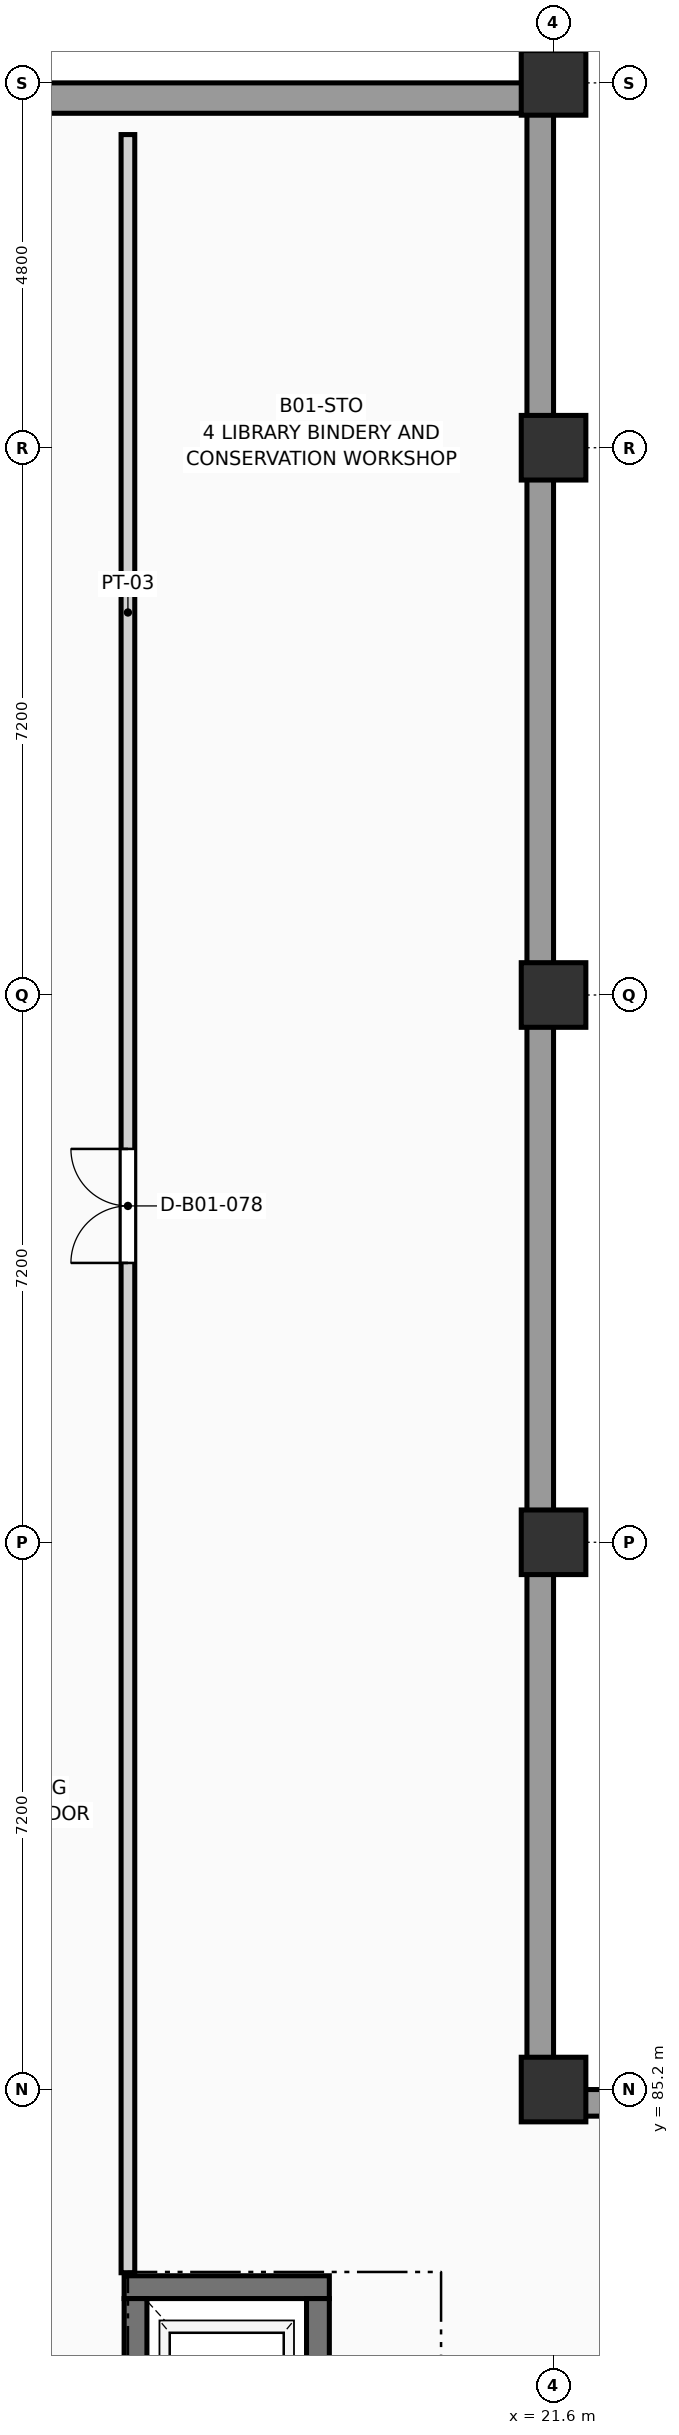
"""IFC4 building model, lengths in metres.
Left out: names, types, materials, properties, quantities, classifications, styles, units other than length and angle.
Written with IfcOpenShell. Run it as: python <this file> out.ifc"""

import sys

from ifc_helpers import new_model, si_unit, direction, frame, frame_2d, origin, origin_2d, place, context, subcontext, project, spatial, rectangle, extrude, element, fill, save


model = new_model("IFC4")
c1 = context("Model", 3, precision=1e-05, world=origin(), true_north=direction((0.0, 1.0)))
c2 = subcontext(c1, "Body", "Model", "MODEL_VIEW")
j1 = project(units=[si_unit("LENGTHUNIT", "METRE"), si_unit("PLANEANGLEUNIT", "RADIAN")], contexts=[c1])
p1 = place(None, origin())
s1 = spatial("IfcSite", under=j1, at=p1, CompositionType="ELEMENT")
p2 = place(p1, origin())
s2 = spatial("IfcBuilding", under=s1, at=p2, CompositionType="ELEMENT")
p3 = place(p2, frame((0.0, 0.0, -4.5)))
s3 = spatial("IfcBuildingStorey", under=s2, at=p3, CompositionType="ELEMENT", Elevation=-4.5)
for number, where, z_axis, x_axis in (
    (1, (21.6, 85.2, -0.28), (0.0, 0.0, 1.0), (1.0, 0.0, 0.0)),
    (2, (21.6, 92.4, -0.28), (0.0, 0.0, 1.0), (1.0, 0.0, 0.0)),
    (3, (21.6, 99.6, -0.28), (0.0, 0.0, 1.0), (1.0, 0.0, 0.0)),
    (4, (21.6, 106.8, -0.28), (0.0, 0.0, 1.0), (1.0, 0.0, 0.0)),
    (5, (21.6, 111.6, -0.28), (0.0, 0.0, 1.0), (1.0, 0.0, 0.0)),
):
    element("IfcColumn", number, at=place(p3, frame(where, z_axis=z_axis, x_axis=x_axis)), inside=s3, PredefinedType="COLUMN", context=c2, shape_type="SweptSolid", body=[
        extrude(rectangle(XDim=0.85, YDim=0.85, at=origin_2d()), origin(), (0.0, 0.0, 1.0), 4.78),
    ])
p4 = place(p3, frame((0.0, 111.4, -0.3), z_axis=(0.0, 0.0, 1.0), x_axis=(1.0, 0.0, 0.0)))
e6 = element("IfcWall", 6, at=p4, inside=s3, PredefinedType="USERDEFINED", context=c2, shape_type="SweptSolid", body=[
    extrude(rectangle(XDim=21.6, YDim=0.4, at=frame_2d((10.8, 0.0))), origin(), (0.0, 0.0, 1.0), 4.54),
])
p5 = place(p3, frame((21.425, 111.6, -0.3), z_axis=(0.0, 0.0, 1.0), x_axis=(0.0, -1.0, 0.0)))
e7 = element("IfcWall", 7, at=p5, inside=s3, PredefinedType="USERDEFINED", context=c2, shape_type="SweptSolid", body=[
    extrude(rectangle(XDim=26.4, YDim=0.35, at=frame_2d((13.2, 0.0))), origin(), (0.0, 0.0, 1.0), 4.54),
])
p6 = place(p3, frame((21.6, 85.025, -0.3), z_axis=(0.0, 0.0, 1.0), x_axis=(1.0, 0.0, 0.0)))
e8 = element("IfcWall", 8, at=p6, inside=s3, PredefinedType="USERDEFINED", context=c2, shape_type="SweptSolid", body=[
    extrude(rectangle(XDim=7.2, YDim=0.35, at=frame_2d((3.6, 0.0))), origin(), (0.0, 0.0, 1.0), 4.54),
])
p7 = place(p3, frame((15.95, 82.6, -1.6), z_axis=(0.0, 0.0, 1.0), x_axis=(1.0, 0.0, 0.0)))
e9 = element("IfcWall", 9, at=p7, inside=s3, PredefinedType="SHEAR", context=c2, shape_type="SweptSolid", body=[
    extrude(rectangle(XDim=2.7, YDim=0.3, at=frame_2d((1.35, 0.0))), origin(), (0.0, 0.0, 1.0), 5.84),
])
p8 = place(p3, frame((16.1, 79.78, -1.6), z_axis=(0.0, 0.0, 1.0), x_axis=(0.0, 1.0, 0.0)))
e10 = element("IfcWall", 10, at=p8, inside=s3, PredefinedType="SHEAR", context=c2, shape_type="SweptSolid", body=[
    extrude(rectangle(XDim=2.67, YDim=0.3, at=frame_2d((1.335, 0.0))), origin(), (0.0, 0.0, 1.0), 5.84),
])
p9 = place(p8, frame((0.785, 0.0, 1.6)))
e11 = element("IfcOpeningElement", 11, at=p9, cuts=e10, PredefinedType="OPENING", context=c2, shape_type="SweptSolid", body=[
    extrude(rectangle(XDim=1.1, YDim=2.2, at=frame_2d((0.55, 1.1))), frame((0.0, 0.162, 0.0), z_axis=(0.0, -1.0, 0.0), x_axis=(1.0, 0.0, 0.0)), (0.0, 0.0, 1.0), 0.324),
])
p10 = place(p3, frame((18.5, 79.78, -1.6), z_axis=(0.0, 0.0, 1.0), x_axis=(0.0, 1.0, 0.0)))
e12 = element("IfcWall", 12, at=p10, inside=s3, PredefinedType="SHEAR", context=c2, shape_type="SweptSolid", body=[
    extrude(rectangle(XDim=2.67, YDim=0.3, at=frame_2d((1.335, 0.0))), origin(), (0.0, 0.0, 1.0), 5.84),
])
p11 = place(p3, frame((16.0, 82.79, 0.0), z_axis=(0.0, 0.0, 1.0), x_axis=(0.0, 1.0, 0.0)))
e13 = element("IfcWall", 13, at=p11, inside=s3, PredefinedType="PARTITIONING", context=c2, shape_type="SweptSolid", body=[
    extrude(rectangle(XDim=28.13, YDim=0.18, at=frame_2d((14.065, 0.0))), origin(), (0.0, 0.0, 1.0), 4.225),
])
p12 = place(p11, frame((13.285, 0.0, 0.0)))
e14 = element("IfcOpeningElement", 14, at=p12, cuts=e13, PredefinedType="OPENING", context=c2, shape_type="SweptSolid", body=[
    extrude(rectangle(XDim=1.5, YDim=2.25, at=frame_2d((0.75, 1.125))), frame((0.0, 0.102, 0.0), z_axis=(0.0, -1.0, 0.0), x_axis=(1.0, 0.0, 0.0)), (0.0, 0.0, 1.0), 0.204),
])
p13 = place(p12, origin())
e15 = element("IfcDoor", 15, at=p13, inside=s3, OperationType="DOUBLE_DOOR_SINGLE_SWING", PredefinedType="DOOR", context=c2, shape_type="SweptSolid", body=[
    extrude(rectangle(XDim=1.5, YDim=2.25, at=frame_2d((0.75, 1.125))), frame((0.0, 0.025, 0.0), z_axis=(0.0, -1.0, 0.0), x_axis=(1.0, 0.0, 0.0)), (0.0, 0.0, 1.0), 0.05),
])
fill(e14, e15)
save(model, sys.argv[1])
